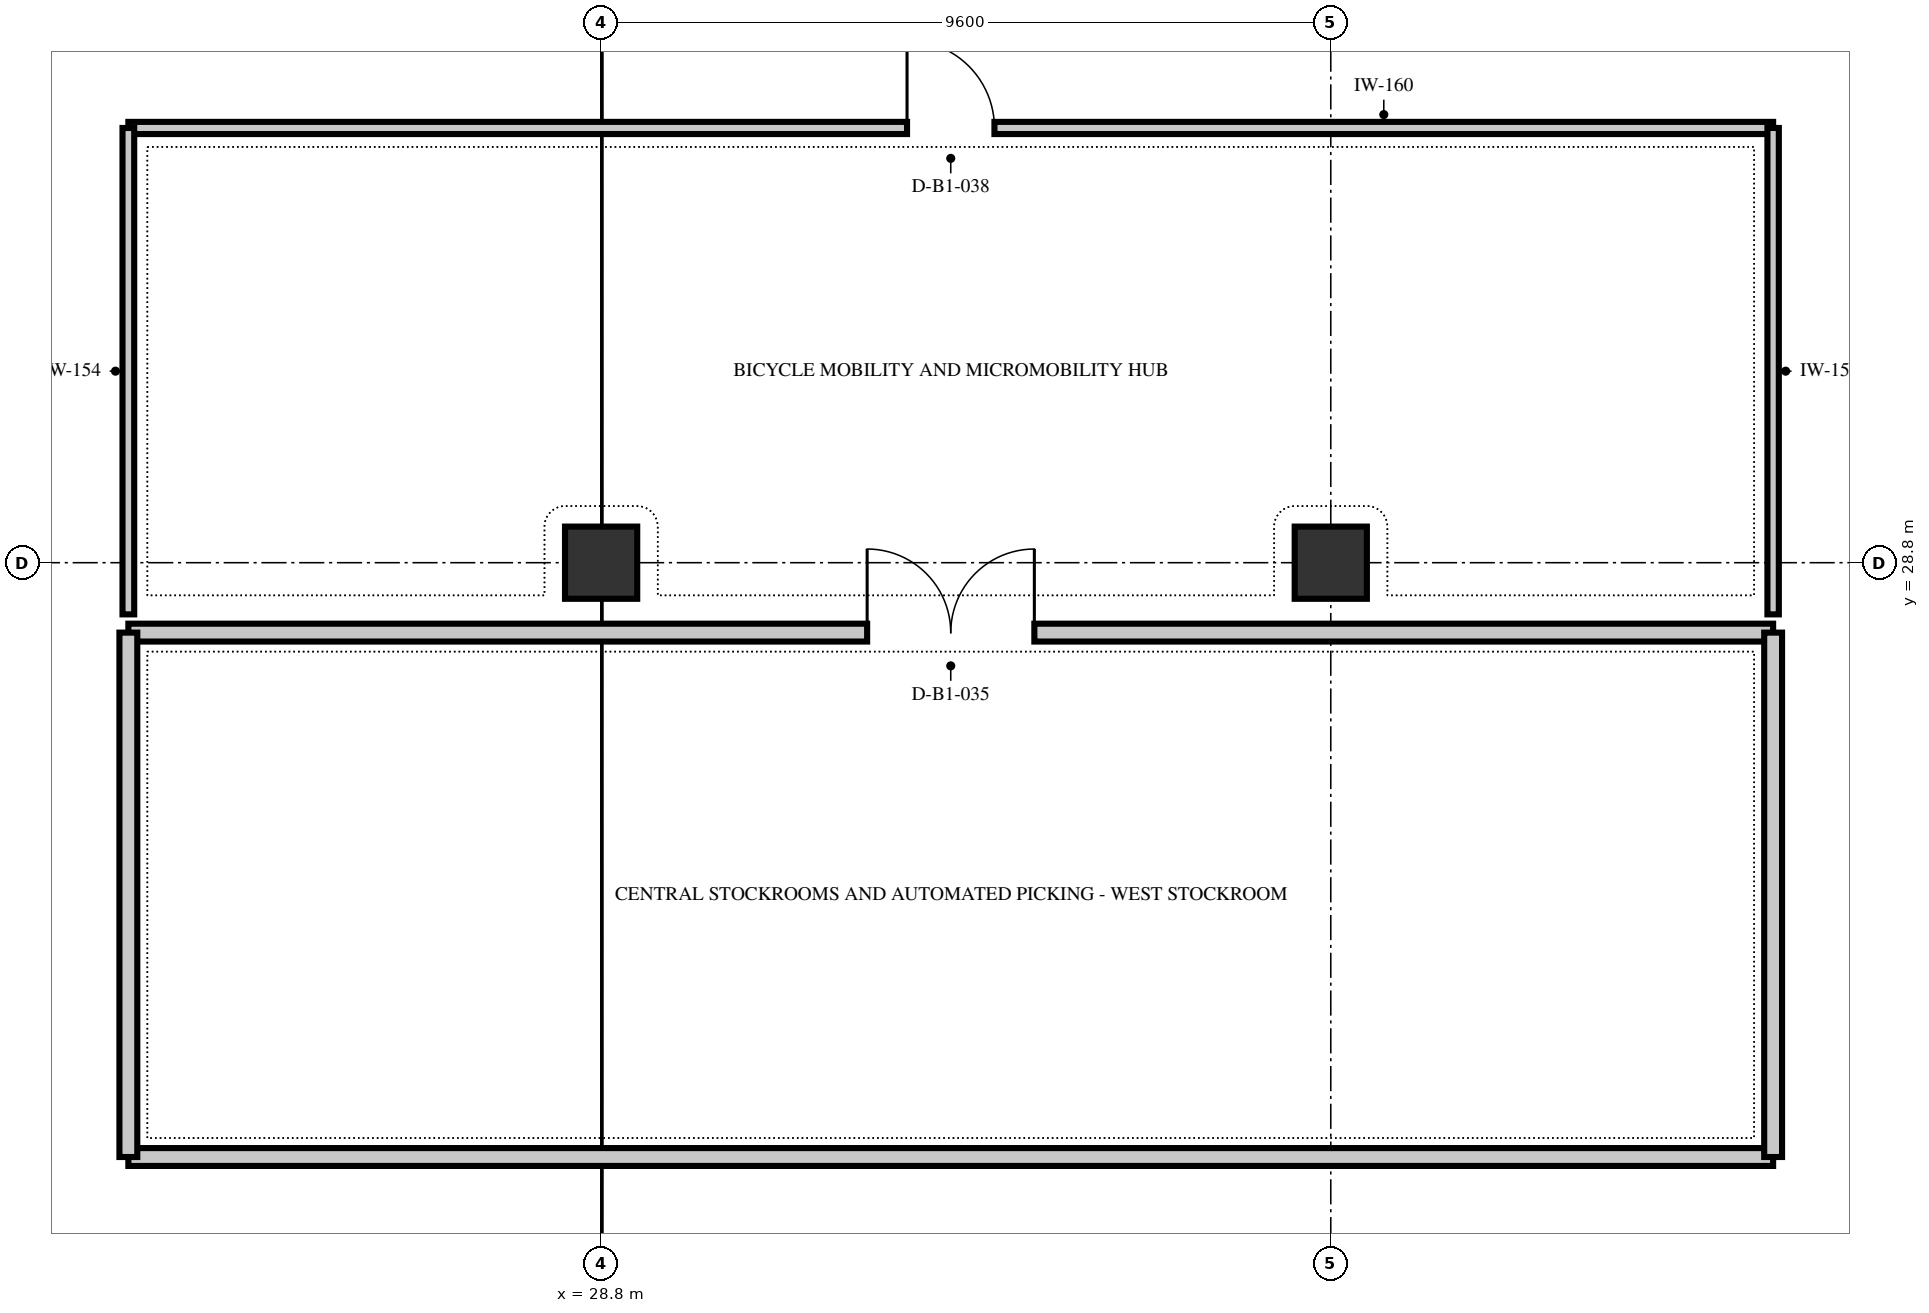
"""IFC4 building model, lengths in metres.
Left out: names, types, materials, properties, quantities, classifications, styles, units other than length and angle.
Written with IfcOpenShell. Run it as: python <this file> out.ifc"""

import sys

from ifc_helpers import new_model, si_unit, direction, frame, frame_2d, origin, origin_2d, place, context, subcontext, project, spatial, rectangle, extrude, element, fill, save


model = new_model("IFC4")
c1 = context("Model", 3, precision=1e-05, world=origin(), true_north=direction((0.0, 1.0)))
c2 = subcontext(c1, "Body", "Model", "MODEL_VIEW")
j1 = project(units=[si_unit("LENGTHUNIT", "METRE"), si_unit("PLANEANGLEUNIT", "RADIAN")], contexts=[c1])
p1 = place(None, origin())
s1 = spatial("IfcSite", under=j1, at=p1, CompositionType="ELEMENT")
p2 = place(p1, origin())
s2 = spatial("IfcBuilding", under=s1, at=p2, CompositionType="ELEMENT")
p3 = place(p2, frame((0.0, 0.0, -4.8)))
s3 = spatial("IfcBuildingStorey", under=s2, at=p3, CompositionType="ELEMENT", Elevation=-4.8)
for number, where, z_axis, x_axis in (
    (1, (28.8, 28.8, 0.0), (0.0, 0.0, 1.0), (1.0, 0.0, 0.0)),
    (2, (38.4, 28.8, 0.0), (0.0, 0.0, 1.0), (1.0, 0.0, 0.0)),
):
    element("IfcColumn", number, at=place(p3, frame(where, z_axis=z_axis, x_axis=x_axis)), inside=s3, PredefinedType="COLUMN", context=c2, shape_type="SweptSolid", body=[
        extrude(rectangle(XDim=0.95, YDim=0.95, at=origin_2d()), origin(), (0.0, 0.0, 1.0), 4.8),
    ])
p4 = place(p3, frame((22.58, 27.88, 0.0), z_axis=(0.0, 0.0, 1.0), x_axis=(1.0, 0.0, 0.0)))
e3 = element("IfcWall", 3, at=p4, inside=s3, PredefinedType="PARTITIONING", context=c2, shape_type="SweptSolid", body=[
    extrude(rectangle(XDim=21.64, YDim=0.235, at=frame_2d((10.82, 0.0))), origin(), (0.0, 0.0, 1.0), 3.44),
])
p5 = place(p4, frame((9.72, 0.0, 0.0)))
e4 = element("IfcOpeningElement", 4, at=p5, cuts=e3, PredefinedType="OPENING", context=c2, shape_type="SweptSolid", body=[
    extrude(rectangle(XDim=2.2, YDim=2.5, at=frame_2d((1.1, 1.25))), frame((0.0, 0.129, 0.0), z_axis=(0.0, -1.0, 0.0), x_axis=(1.0, 0.0, 0.0)), (0.0, 0.0, 1.0), 0.259),
])
p6 = place(p3, frame((44.22, 20.98, 0.0), z_axis=(0.0, 0.0, 1.0), x_axis=(-1.0, 0.0, 0.0)))
e5 = element("IfcWall", 5, at=p6, inside=s3, PredefinedType="PARTITIONING", context=c2, shape_type="SweptSolid", body=[
    extrude(rectangle(XDim=21.64, YDim=0.235, at=frame_2d((10.82, 0.0))), origin(), (0.0, 0.0, 1.0), 3.44),
])
for number, where, z_axis, x_axis in (
    (6, (22.58, 20.98, 0.0), (0.0, 0.0, 1.0), (0.0, 1.0, 0.0)),
    (7, (44.22, 27.88, 0.0), (0.0, 0.0, 1.0), (0.0, -1.0, 0.0)),
):
    element("IfcWall", number, at=place(p3, frame(where, z_axis=z_axis, x_axis=x_axis)), inside=s3, PredefinedType="PARTITIONING", context=c2, shape_type="SweptSolid", body=[
        extrude(rectangle(XDim=6.9, YDim=0.235, at=frame_2d((3.45, 0.0))), origin(), (0.0, 0.0, 1.0), 4.5),
    ])
p7 = place(p3, frame((22.58, 34.52, 0.0), z_axis=(0.0, 0.0, 1.0), x_axis=(1.0, 0.0, 0.0)))
e8 = element("IfcWall", 8, at=p7, inside=s3, PredefinedType="PARTITIONING", context=c2, shape_type="SweptSolid", body=[
    extrude(rectangle(XDim=21.64, YDim=0.16, at=frame_2d((10.82, 0.0))), origin(), (0.0, 0.0, 1.0), 3.44),
])
p8 = place(p7, frame((10.245, 0.0, 0.0)))
e9 = element("IfcOpeningElement", 9, at=p8, cuts=e8, PredefinedType="OPENING", context=c2, shape_type="SweptSolid", body=[
    extrude(rectangle(XDim=1.15, YDim=2.2, at=frame_2d((0.575, 1.1))), frame((0.0, 0.092, 0.0), z_axis=(0.0, -1.0, 0.0), x_axis=(1.0, 0.0, 0.0)), (0.0, 0.0, 1.0), 0.184),
])
p9 = place(p3, frame((22.58, 28.12, 0.0), z_axis=(0.0, 0.0, 1.0), x_axis=(0.0, 1.0, 0.0)))
e10 = element("IfcWall", 10, at=p9, inside=s3, PredefinedType="PARTITIONING", context=c2, shape_type="SweptSolid", body=[
    extrude(rectangle(XDim=6.4, YDim=0.154, at=frame_2d((3.2, 0.0))), origin(), (0.0, 0.0, 1.0), 3.44),
])
p10 = place(p3, frame((44.22, 34.52, 0.0), z_axis=(0.0, 0.0, 1.0), x_axis=(0.0, -1.0, 0.0)))
e11 = element("IfcWall", 11, at=p10, inside=s3, PredefinedType="PARTITIONING", context=c2, shape_type="SweptSolid", body=[
    extrude(rectangle(XDim=6.4, YDim=0.15, at=frame_2d((3.2, 0.0))), origin(), (0.0, 0.0, 1.0), 3.44),
])
p11 = place(p5, origin())
e12 = element("IfcDoor", 12, at=p11, inside=s3, OperationType="DOUBLE_DOOR_SINGLE_SWING", PredefinedType="DOOR", context=c2, shape_type="SweptSolid", body=[
    extrude(rectangle(XDim=2.2, YDim=2.5, at=frame_2d((1.1, 1.25))), frame((0.0, 0.025, 0.0), z_axis=(0.0, -1.0, 0.0), x_axis=(1.0, 0.0, 0.0)), (0.0, 0.0, 1.0), 0.05),
])
fill(e4, e12)
p12 = place(p8, origin())
e13 = element("IfcDoor", 13, at=p12, inside=s3, OperationType="SINGLE_SWING_LEFT", PredefinedType="DOOR", context=c2, shape_type="SweptSolid", body=[
    extrude(rectangle(XDim=1.15, YDim=2.2, at=frame_2d((0.575, 1.1))), frame((0.0, 0.025, 0.0), z_axis=(0.0, -1.0, 0.0), x_axis=(1.0, 0.0, 0.0)), (0.0, 0.0, 1.0), 0.05),
])
fill(e9, e13)
save(model, sys.argv[1])
